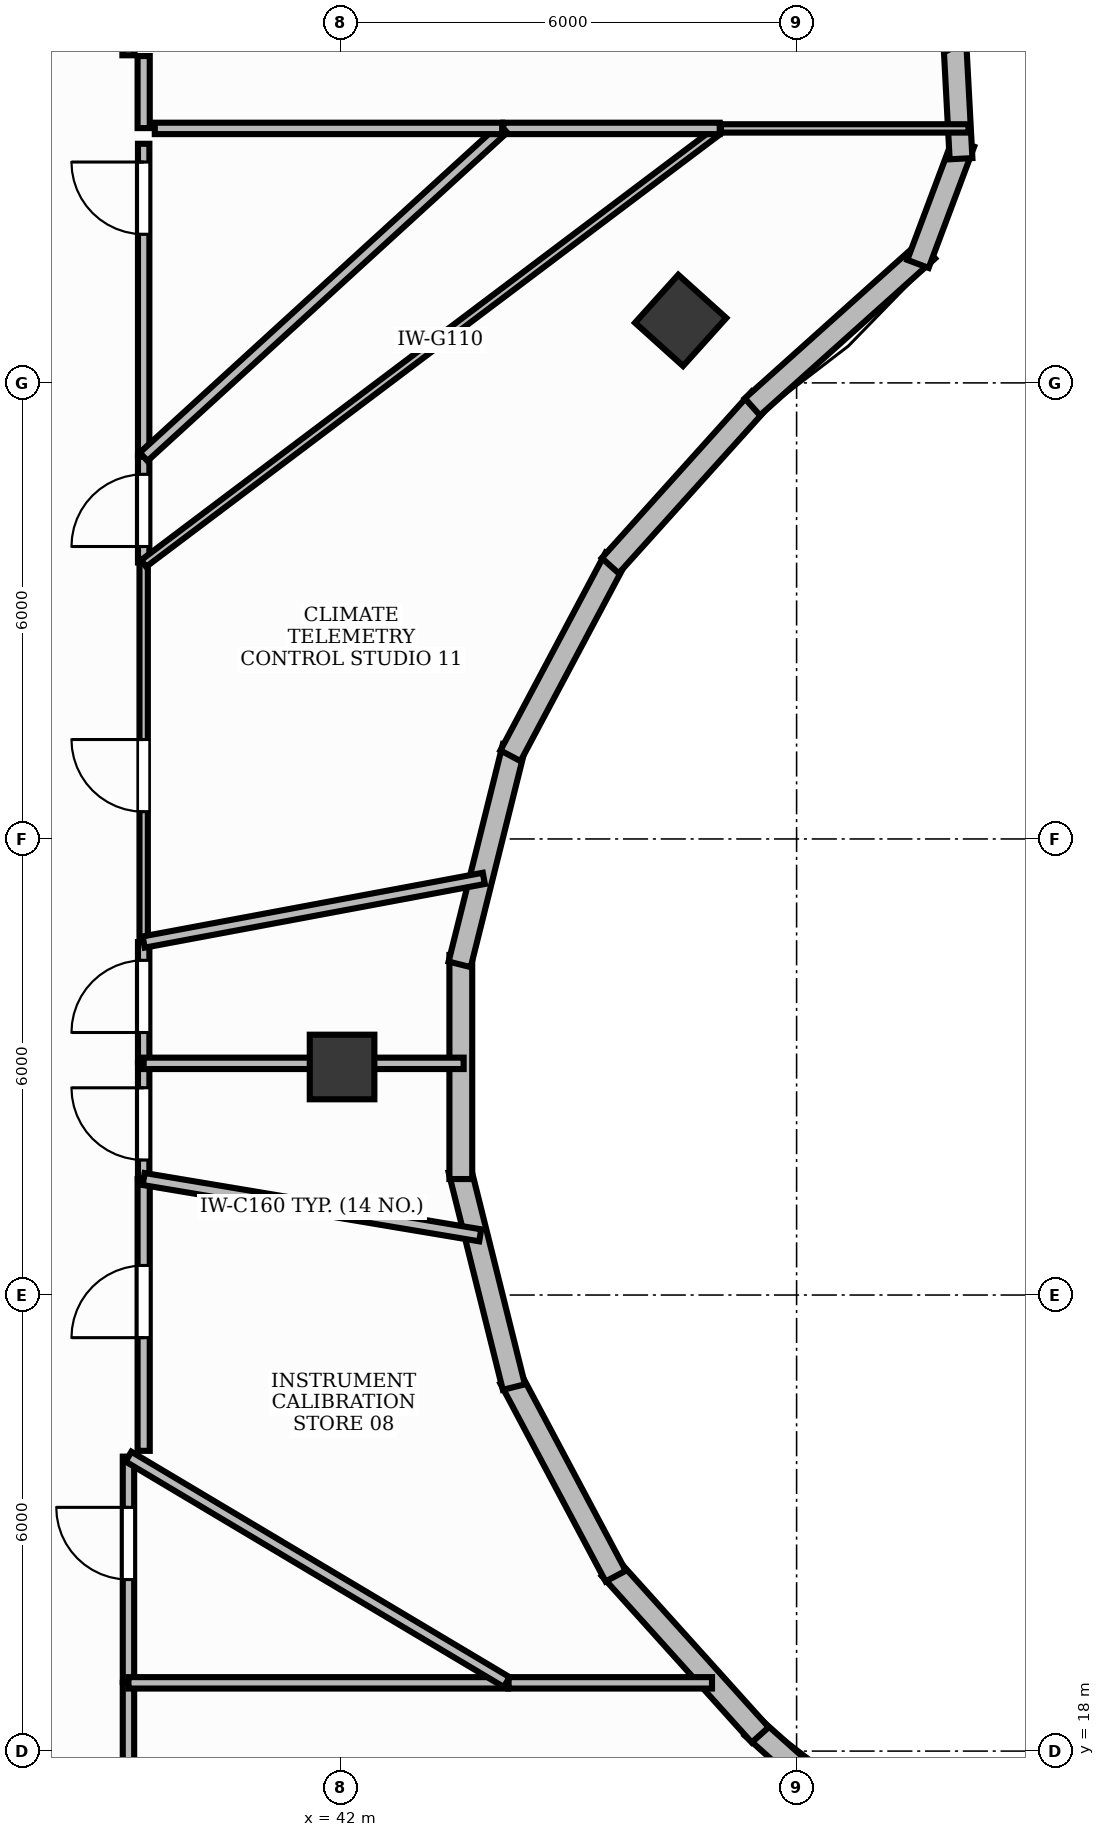
"""IFC4 building model, lengths in metres.
Left out: names, types, materials, properties, quantities, classifications, styles, units other than length and angle.
Written with IfcOpenShell. Run it as: python <this file> out.ifc"""

import sys

from ifc_helpers import new_model, si_unit, direction, frame, frame_2d, origin, origin_2d, place, context, subcontext, project, spatial, rectangle, extrude, element, fill, save


model = new_model("IFC4")
c1 = context("Model", 3, precision=1e-05, world=origin(), true_north=direction((0.0, 1.0)))
c2 = subcontext(c1, "Body", "Model", "MODEL_VIEW")
j1 = project(units=[si_unit("LENGTHUNIT", "METRE"), si_unit("PLANEANGLEUNIT", "RADIAN")], contexts=[c1])
p1 = place(None, origin())
s1 = spatial("IfcSite", under=j1, at=p1, CompositionType="ELEMENT")
p2 = place(p1, origin())
s2 = spatial("IfcBuilding", under=s1, at=p2, CompositionType="ELEMENT")
p3 = place(p2, frame((0.0, 0.0, 291.0)))
s3 = spatial("IfcBuildingStorey", under=s2, at=p3, CompositionType="ELEMENT", Elevation=291.0)
for number, where, z_axis, x_axis in (
    (1, (42.02, 27.0, -0.0), (0.0, 0.0, 1.0), (0.0, 1.0, 0.0)),
    (2, (46.475, 36.823, -0.0), (0.0, 0.0, 1.0), (0.669, 0.743, 0.0)),
):
    element("IfcColumn", number, at=place(p3, frame(where, z_axis=z_axis, x_axis=x_axis)), inside=s3, PredefinedType="COLUMN", context=c2, shape_type="SweptSolid", body=[
        extrude(rectangle(XDim=0.85, YDim=0.85, at=origin_2d()), origin(), (0.0, 0.0, 1.0), 6.301),
    ])
p4 = place(p3, frame((49.722, 16.251, 0.0), z_axis=(0.0, 0.0, 1.0), x_axis=(-0.744720921046, 0.667376018266, 0.0)))
e3 = element("IfcWall", 3, at=p4, inside=s3, PredefinedType="STANDARD", context=c2, shape_type="SweptSolid", body=[
    extrude(rectangle(XDim=3.094, YDim=0.3, at=frame_2d((1.547, 0.0))), origin(), (0.0, 0.0, 1.0), 6.3),
])
p5 = place(p3, frame((47.521, 18.213, 0.0), z_axis=(0.0, 0.0, 1.0), x_axis=(-0.669166006669, 0.743112949368, 0.0)))
e4 = element("IfcWall", 4, at=p5, inside=s3, PredefinedType="STANDARD", context=c2, shape_type="SweptSolid", body=[
    extrude(rectangle(XDim=2.948, YDim=0.3, at=frame_2d((1.474, 0.0))), origin(), (0.0, 0.0, 1.0), 6.3),
])
p6 = place(p3, frame((45.62, 20.302, 0.0), z_axis=(0.0, 0.0, 1.0), x_axis=(-0.469466013123, 0.882950543644, 0.0)))
e5 = element("IfcWall", 5, at=p6, inside=s3, PredefinedType="STANDARD", context=c2, shape_type="SweptSolid", body=[
    extrude(rectangle(XDim=2.948, YDim=0.3, at=frame_2d((1.474, 0.0))), origin(), (0.0, 0.0, 1.0), 5.025),
])
p7 = place(p3, frame((44.281, 22.789, 0.0), z_axis=(0.0, 0.0, 1.0), x_axis=(-0.24195108751, 0.970288447449, 0.0)))
e6 = element("IfcWall", 6, at=p7, inside=s3, PredefinedType="STANDARD", context=c2, shape_type="SweptSolid", body=[
    extrude(rectangle(XDim=2.948, YDim=0.3, at=frame_2d((1.474, 0.0))), origin(), (0.0, 0.0, 1.0), 5.025),
])
p8 = place(p3, frame((43.583, 25.526, 0.0), z_axis=(0.0, 0.0, 1.0), x_axis=(0.0, 1.0, 0.0)))
e7 = element("IfcWall", 7, at=p8, inside=s3, PredefinedType="STANDARD", context=c2, shape_type="SweptSolid", body=[
    extrude(rectangle(XDim=2.948, YDim=0.3, at=frame_2d((1.474, 0.0))), origin(), (0.0, 0.0, 1.0), 6.3),
])
p9 = place(p3, frame((43.567, 28.35, 0.0), z_axis=(0.0, 0.0, 1.0), x_axis=(0.24195108751, 0.970288447449, 0.0)))
e8 = element("IfcWall", 8, at=p9, inside=s3, PredefinedType="STANDARD", context=c2, shape_type="SweptSolid", body=[
    extrude(rectangle(XDim=2.948, YDim=0.3, at=frame_2d((1.474, 0.0))), origin(), (0.0, 0.0, 1.0), 5.025),
])
p10 = place(p3, frame((44.236, 31.095, 0.0), z_axis=(0.0, 0.0, 1.0), x_axis=(0.469466013123, 0.882950543644, 0.0)))
e9 = element("IfcWall", 9, at=p10, inside=s3, PredefinedType="STANDARD", context=c2, shape_type="SweptSolid", body=[
    extrude(rectangle(XDim=2.948, YDim=0.3, at=frame_2d((1.474, 0.0))), origin(), (0.0, 0.0, 1.0), 5.025),
])
p11 = place(p3, frame((45.548, 33.596, 0.0), z_axis=(0.0, 0.0, 1.0), x_axis=(0.669166006669, 0.743112949368, 0.0)))
e10 = element("IfcWall", 10, at=p11, inside=s3, PredefinedType="STANDARD", context=c2, shape_type="SweptSolid", body=[
    extrude(rectangle(XDim=2.948, YDim=0.3, at=frame_2d((1.474, 0.0))), origin(), (0.0, 0.0, 1.0), 6.3),
])
p12 = place(p3, frame((47.419, 35.684, 0.0), z_axis=(0.0, 0.0, 1.0), x_axis=(0.744720921046, 0.667376018266, 0.0)))
e11 = element("IfcWall", 11, at=p12, inside=s3, PredefinedType="STANDARD", context=c2, shape_type="SweptSolid", body=[
    extrude(rectangle(XDim=3.094, YDim=0.3, at=frame_2d((1.547, 0.0))), origin(), (0.0, 0.0, 1.0), 6.3),
])
for number, where, z_axis, x_axis in (
    (12, (49.597, 37.565, 0.0), (0.0, 0.0, 1.0), (0.351, 0.936, 0.0)),
    (13, (50.163, 38.949, 0.0), (0.0, 0.0, 1.0), (-0.053, 0.999, 0.0)),
):
    element("IfcWall", number, at=place(p3, frame(where, z_axis=z_axis, x_axis=x_axis)), inside=s3, PredefinedType="STANDARD", context=c2, shape_type="SweptSolid", body=[
        extrude(rectangle(XDim=1.704, YDim=0.3, at=frame_2d((0.852, 0.0))), origin(), (0.0, 0.0, 1.0), 6.3),
    ])
p13 = place(p3, frame((39.21, 14.0, 0.0), z_axis=(0.0, 0.0, 1.0), x_axis=(0.0, 1.0, 0.0)))
e14 = element("IfcWall", 14, at=p13, inside=s3, PredefinedType="PARTITIONING", context=c2, shape_type="SweptSolid", body=[
    extrude(rectangle(XDim=4.898, YDim=0.15, at=frame_2d((2.449, 0.0))), origin(), (0.0, 0.0, 1.0), 4.61),
])
p14 = place(p13, frame((0.24, 0.0, 0.0)))
e15 = element("IfcOpeningElement", 15, at=p14, cuts=e14, PredefinedType="OPENING", context=c2, shape_type="SweptSolid", body=[
    extrude(rectangle(XDim=0.95, YDim=2.15, at=frame_2d((0.475, 1.075))), frame((0.0, 0.09, 0.0), z_axis=(0.0, -1.0, 0.0), x_axis=(1.0, 0.0, 0.0)), (0.0, 0.0, 1.0), 0.18),
])
p15 = place(p3, frame((39.21, 18.908, 0.0), z_axis=(0.0, 0.0, 1.0), x_axis=(0.0, 1.0, 0.0)))
e16 = element("IfcWall", 16, at=p15, inside=s3, PredefinedType="PARTITIONING", context=c2, shape_type="SweptSolid", body=[
    extrude(rectangle(XDim=2.966, YDim=0.15, at=frame_2d((1.483, 0.0))), origin(), (0.0, 0.0, 1.0), 4.61),
])
p16 = place(p15, frame((1.348, 0.0, 0.0)))
e17 = element("IfcOpeningElement", 17, at=p16, cuts=e16, PredefinedType="OPENING", context=c2, shape_type="SweptSolid", body=[
    extrude(rectangle(XDim=0.95, YDim=2.15, at=frame_2d((0.475, 1.075))), frame((0.0, 0.09, 0.0), z_axis=(0.0, -1.0, 0.0), x_axis=(1.0, 0.0, 0.0)), (0.0, 0.0, 1.0), 0.18),
])
p17 = place(p3, frame((39.41, 21.95, 0.0), z_axis=(0.0, 0.0, 1.0), x_axis=(0.0, 1.0, 0.0)))
e18 = element("IfcWall", 18, at=p17, inside=s3, PredefinedType="PARTITIONING", context=c2, shape_type="SweptSolid", body=[
    extrude(rectangle(XDim=3.576, YDim=0.16, at=frame_2d((1.788, 0.0))), origin(), (0.0, 0.0, 1.0), 4.61),
])
p18 = place(p17, frame((1.489, 0.0, 0.0)))
e19 = element("IfcOpeningElement", 19, at=p18, cuts=e18, PredefinedType="OPENING", context=c2, shape_type="SweptSolid", body=[
    extrude(rectangle(XDim=0.95, YDim=2.15, at=frame_2d((0.475, 1.075))), frame((0.0, 0.095, 0.0), z_axis=(0.0, -1.0, 0.0), x_axis=(1.0, 0.0, 0.0)), (0.0, 0.0, 1.0), 0.19),
])
p19 = place(p3, frame((39.41, 25.536, 0.0), z_axis=(0.0, 0.0, 1.0), x_axis=(0.0, 1.0, 0.0)))
e20 = element("IfcWall", 20, at=p19, inside=s3, PredefinedType="PARTITIONING", context=c2, shape_type="SweptSolid", body=[
    extrude(rectangle(XDim=1.512, YDim=0.15, at=frame_2d((0.756, 0.0))), origin(), (0.0, 0.0, 1.0), 4.61),
])
p20 = place(p19, frame((0.24, 0.0, 0.0)))
e21 = element("IfcOpeningElement", 21, at=p20, cuts=e20, PredefinedType="OPENING", context=c2, shape_type="SweptSolid", body=[
    extrude(rectangle(XDim=0.95, YDim=2.15, at=frame_2d((0.475, 1.075))), frame((0.0, 0.09, 0.0), z_axis=(0.0, -1.0, 0.0), x_axis=(1.0, 0.0, 0.0)), (0.0, 0.0, 1.0), 0.18),
])
p21 = place(p3, frame((39.41, 27.058, 0.0), z_axis=(0.0, 0.0, 1.0), x_axis=(0.0, 1.0, 0.0)))
e22 = element("IfcWall", 22, at=p21, inside=s3, PredefinedType="PARTITIONING", context=c2, shape_type="SweptSolid", body=[
    extrude(rectangle(XDim=1.586, YDim=0.15, at=frame_2d((0.793, 0.0))), origin(), (0.0, 0.0, 1.0), 4.61),
])
p22 = place(p21, frame((0.396, 0.0, 0.0)))
e23 = element("IfcOpeningElement", 23, at=p22, cuts=e22, PredefinedType="OPENING", context=c2, shape_type="SweptSolid", body=[
    extrude(rectangle(XDim=0.95, YDim=2.15, at=frame_2d((0.475, 1.075))), frame((0.0, 0.09, 0.0), z_axis=(0.0, -1.0, 0.0), x_axis=(1.0, 0.0, 0.0)), (0.0, 0.0, 1.0), 0.18),
])
p23 = place(p3, frame((39.41, 28.654, 0.0), z_axis=(0.0, 0.0, 1.0), x_axis=(0.0, 1.0, 0.0)))
e24 = element("IfcWall", 24, at=p23, inside=s3, PredefinedType="MOVABLE", context=c2, shape_type="SweptSolid", body=[
    extrude(rectangle(XDim=4.97, YDim=0.11, at=frame_2d((2.485, 0.0))), origin(), (0.0, 0.0, 1.0), 4.61),
])
p24 = place(p23, frame((1.704, 0.0, 0.0)))
e25 = element("IfcOpeningElement", 25, at=p24, cuts=e24, PredefinedType="OPENING", context=c2, shape_type="SweptSolid", body=[
    extrude(rectangle(XDim=0.95, YDim=2.15, at=frame_2d((0.475, 1.075))), frame((0.0, 0.07, 0.0), z_axis=(0.0, -1.0, 0.0), x_axis=(1.0, 0.0, 0.0)), (0.0, 0.0, 1.0), 0.14),
])
p25 = place(p3, frame((39.41, 33.637, 0.0), z_axis=(0.0, 0.0, 1.0), x_axis=(0.0, 1.0, 0.0)))
e26 = element("IfcWall", 26, at=p25, inside=s3, PredefinedType="PARTITIONING", context=c2, shape_type="SweptSolid", body=[
    extrude(rectangle(XDim=1.391, YDim=0.15, at=frame_2d((0.695, 0.0))), origin(), (0.0, 0.0, 1.0), 4.61),
])
p26 = place(p25, frame((0.21, 0.0, 0.0)))
e27 = element("IfcOpeningElement", 27, at=p26, cuts=e26, PredefinedType="OPENING", context=c2, shape_type="SweptSolid", body=[
    extrude(rectangle(XDim=0.95, YDim=2.15, at=frame_2d((0.475, 1.075))), frame((0.0, 0.09, 0.0), z_axis=(0.0, -1.0, 0.0), x_axis=(1.0, 0.0, 0.0)), (0.0, 0.0, 1.0), 0.18),
])
p27 = place(p3, frame((39.41, 35.041, 0.0), z_axis=(0.0, 0.0, 1.0), x_axis=(0.0, 1.0, 0.0)))
e28 = element("IfcWall", 28, at=p27, inside=s3, PredefinedType="PARTITIONING", context=c2, shape_type="SweptSolid", body=[
    extrude(rectangle(XDim=4.104, YDim=0.15, at=frame_2d((2.052, 0.0))), origin(), (0.0, 0.0, 1.0), 4.61),
])
p28 = place(p27, frame((2.914, 0.0, 0.0)))
e29 = element("IfcOpeningElement", 29, at=p28, cuts=e28, PredefinedType="OPENING", context=c2, shape_type="SweptSolid", body=[
    extrude(rectangle(XDim=0.95, YDim=2.15, at=frame_2d((0.475, 1.075))), frame((0.0, 0.09, 0.0), z_axis=(0.0, -1.0, 0.0), x_axis=(1.0, 0.0, 0.0)), (0.0, 0.0, 1.0), 0.18),
])
p29 = place(p3, frame((44.211, 18.898, 0.0), z_axis=(0.0, 0.0, 1.0), x_axis=(1.0, 0.0, 0.0)))
e30 = element("IfcWall", 30, at=p29, inside=s3, PredefinedType="PARTITIONING", context=c2, shape_type="SweptSolid", body=[
    extrude(rectangle(XDim=2.677, YDim=0.15, at=frame_2d((1.338, 0.0))), origin(), (0.0, 0.0, 1.0), 4.61),
])
p30 = place(p3, frame((39.21, 18.898, 0.0), z_axis=(0.0, 0.0, 1.0), x_axis=(1.0, 0.0, 0.0)))
e31 = element("IfcWall", 31, at=p30, inside=s3, PredefinedType="PARTITIONING", context=c2, shape_type="SweptSolid", body=[
    extrude(rectangle(XDim=4.993, YDim=0.15, at=frame_2d((2.496, 0.0))), origin(), (0.0, 0.0, 1.0), 4.61),
])
p31 = place(p3, frame((39.21, 21.874, 0.0), z_axis=(0.0, 0.0, 1.0), x_axis=(0.858961945301, -0.512039428682, 0.0)))
e32 = element("IfcWall", 32, at=p31, inside=s3, PredefinedType="PARTITIONING", context=c2, shape_type="SweptSolid", body=[
    extrude(rectangle(XDim=5.793, YDim=0.15, at=frame_2d((2.896, 0.0))), origin(), (0.0, 0.0, 1.0), 4.61),
])
p32 = place(p3, frame((39.41, 25.526, 0.0), z_axis=(0.0, 0.0, 1.0), x_axis=(0.986284942524, -0.165051543921, 0.0)))
e33 = element("IfcWall", 33, at=p32, inside=s3, PredefinedType="PARTITIONING", context=c2, shape_type="SweptSolid", body=[
    extrude(rectangle(XDim=4.489, YDim=0.16, at=frame_2d((2.245, 0.0))), origin(), (0.0, 0.0, 1.0), 4.61),
])
p33 = place(p3, frame((39.41, 27.048, 0.0), z_axis=(0.0, 0.0, 1.0), x_axis=(1.0, 0.0, 0.0)))
e34 = element("IfcWall", 34, at=p33, inside=s3, PredefinedType="PARTITIONING", context=c2, shape_type="SweptSolid", body=[
    extrude(rectangle(XDim=4.21, YDim=0.15, at=frame_2d((2.105, 0.0))), origin(), (0.0, 0.0, 1.0), 4.61),
])
p34 = place(p3, frame((39.41, 28.644, 0.0), z_axis=(0.0, 0.0, 1.0), x_axis=(0.982931018961, 0.183974487265, 0.0)))
e35 = element("IfcWall", 35, at=p34, inside=s3, PredefinedType="PARTITIONING", context=c2, shape_type="SweptSolid", body=[
    extrude(rectangle(XDim=4.553, YDim=0.15, at=frame_2d((2.276, 0.0))), origin(), (0.0, 0.0, 1.0), 4.61),
])
p35 = place(p3, frame((39.41, 33.625, 0.0), z_axis=(0.0, 0.0, 1.0), x_axis=(0.798636330538, 0.601813934323, 0.0)))
e36 = element("IfcWall", 36, at=p35, inside=s3, PredefinedType="MOVABLE", context=c2, shape_type="SweptSolid", body=[
    extrude(rectangle(XDim=9.51, YDim=0.11, at=frame_2d((4.755, 0.0))), origin(), (0.0, 0.0, 1.0), 4.61),
])
p36 = place(p3, frame((47.005, 39.348, 0.0), z_axis=(0.0, 0.0, 1.0), x_axis=(1.0, 0.0, 0.0)))
e37 = element("IfcWall", 37, at=p36, inside=s3, PredefinedType="MOVABLE", context=c2, shape_type="SweptSolid", body=[
    extrude(rectangle(XDim=3.257, YDim=0.11, at=frame_2d((1.628, 0.0))), origin(), (0.0, 0.0, 1.0), 4.61),
])
p37 = place(p3, frame((44.141, 39.348, 0.0), z_axis=(0.0, 0.0, 1.0), x_axis=(1.0, 0.0, 0.0)))
e38 = element("IfcWall", 38, at=p37, inside=s3, PredefinedType="PARTITIONING", context=c2, shape_type="SweptSolid", body=[
    extrude(rectangle(XDim=2.847, YDim=0.15, at=frame_2d((1.424, 0.0))), origin(), (0.0, 0.0, 1.0), 4.61),
])
p38 = place(p3, frame((39.41, 35.028, 0.0), z_axis=(0.0, 0.0, 1.0), x_axis=(0.73848136911, 0.674273881651, 0.0)))
e39 = element("IfcWall", 39, at=p38, inside=s3, PredefinedType="PARTITIONING", context=c2, shape_type="SweptSolid", body=[
    extrude(rectangle(XDim=6.407, YDim=0.15, at=frame_2d((3.204, 0.0))), origin(), (0.0, 0.0, 1.0), 4.61),
])
p39 = place(p3, frame((39.556, 39.348, 0.0), z_axis=(0.0, 0.0, 1.0), x_axis=(1.0, 0.0, 0.0)))
e40 = element("IfcWall", 40, at=p39, inside=s3, PredefinedType="PARTITIONING", context=c2, shape_type="SweptSolid", body=[
    extrude(rectangle(XDim=4.57, YDim=0.15, at=frame_2d((2.285, 0.0))), origin(), (0.0, 0.0, 1.0), 4.61),
])
p40 = place(p3, frame((39.41, 39.352, 0.0), z_axis=(0.0, 0.0, 1.0), x_axis=(0.0, 1.0, 0.0)))
e41 = element("IfcWall", 41, at=p40, inside=s3, PredefinedType="PARTITIONING", context=c2, shape_type="SweptSolid", body=[
    extrude(rectangle(XDim=0.948, YDim=0.16, at=frame_2d((0.474, 0.0))), origin(), (0.0, 0.0, 1.0), 4.61),
])
p41 = place(p3, frame((39.21, 40.31, 0.0), z_axis=(0.0, 0.0, 1.0), x_axis=(0.0, 1.0, 0.0)))
e42 = element("IfcWall", 42, at=p41, inside=s3, PredefinedType="PARTITIONING", context=c2, shape_type="SweptSolid", body=[
    extrude(rectangle(XDim=0.44, YDim=0.16, at=frame_2d((0.22, 0.0))), origin(), (0.0, 0.0, 1.0), 4.61),
])
p42 = place(p16, origin())
e43 = element("IfcDoor", 43, at=p42, inside=s3, OperationType="SINGLE_SWING_RIGHT", PredefinedType="DOOR", context=c2, shape_type="SweptSolid", body=[
    extrude(rectangle(XDim=0.95, YDim=2.15, at=frame_2d((0.475, 1.075))), frame((0.0, 0.025, 0.0), z_axis=(0.0, -1.0, 0.0), x_axis=(1.0, 0.0, 0.0)), (0.0, 0.0, 1.0), 0.05),
])
fill(e17, e43)
p43 = place(p18, origin())
e44 = element("IfcDoor", 44, at=p43, inside=s3, OperationType="SINGLE_SWING_LEFT", PredefinedType="DOOR", context=c2, shape_type="SweptSolid", body=[
    extrude(rectangle(XDim=0.95, YDim=2.15, at=frame_2d((0.475, 1.075))), frame((0.0, 0.025, 0.0), z_axis=(0.0, -1.0, 0.0), x_axis=(1.0, 0.0, 0.0)), (0.0, 0.0, 1.0), 0.05),
])
fill(e19, e44)
p44 = place(p20, origin())
e45 = element("IfcDoor", 45, at=p44, inside=s3, OperationType="SINGLE_SWING_RIGHT", PredefinedType="DOOR", context=c2, shape_type="SweptSolid", body=[
    extrude(rectangle(XDim=0.95, YDim=2.15, at=frame_2d((0.475, 1.075))), frame((0.0, 0.025, 0.0), z_axis=(0.0, -1.0, 0.0), x_axis=(1.0, 0.0, 0.0)), (0.0, 0.0, 1.0), 0.05),
])
fill(e21, e45)
p45 = place(p22, origin())
e46 = element("IfcDoor", 46, at=p45, inside=s3, OperationType="SINGLE_SWING_LEFT", PredefinedType="DOOR", context=c2, shape_type="SweptSolid", body=[
    extrude(rectangle(XDim=0.95, YDim=2.15, at=frame_2d((0.475, 1.075))), frame((0.0, 0.025, 0.0), z_axis=(0.0, -1.0, 0.0), x_axis=(1.0, 0.0, 0.0)), (0.0, 0.0, 1.0), 0.05),
])
fill(e23, e46)
p46 = place(p24, origin())
e47 = element("IfcDoor", 47, at=p46, inside=s3, OperationType="SINGLE_SWING_RIGHT", PredefinedType="DOOR", context=c2, shape_type="SweptSolid", body=[
    extrude(rectangle(XDim=0.95, YDim=2.15, at=frame_2d((0.475, 1.075))), frame((0.0, 0.025, 0.0), z_axis=(0.0, -1.0, 0.0), x_axis=(1.0, 0.0, 0.0)), (0.0, 0.0, 1.0), 0.05),
])
fill(e25, e47)
p47 = place(p26, origin())
e48 = element("IfcDoor", 48, at=p47, inside=s3, OperationType="SINGLE_SWING_LEFT", PredefinedType="DOOR", context=c2, shape_type="SweptSolid", body=[
    extrude(rectangle(XDim=0.95, YDim=2.15, at=frame_2d((0.475, 1.075))), frame((0.0, 0.025, 0.0), z_axis=(0.0, -1.0, 0.0), x_axis=(1.0, 0.0, 0.0)), (0.0, 0.0, 1.0), 0.05),
])
fill(e27, e48)
p48 = place(p28, origin())
e49 = element("IfcDoor", 49, at=p48, inside=s3, OperationType="SINGLE_SWING_RIGHT", PredefinedType="DOOR", context=c2, shape_type="SweptSolid", body=[
    extrude(rectangle(XDim=0.95, YDim=2.15, at=frame_2d((0.475, 1.075))), frame((0.0, 0.025, 0.0), z_axis=(0.0, -1.0, 0.0), x_axis=(1.0, 0.0, 0.0)), (0.0, 0.0, 1.0), 0.05),
])
fill(e29, e49)
save(model, sys.argv[1])
